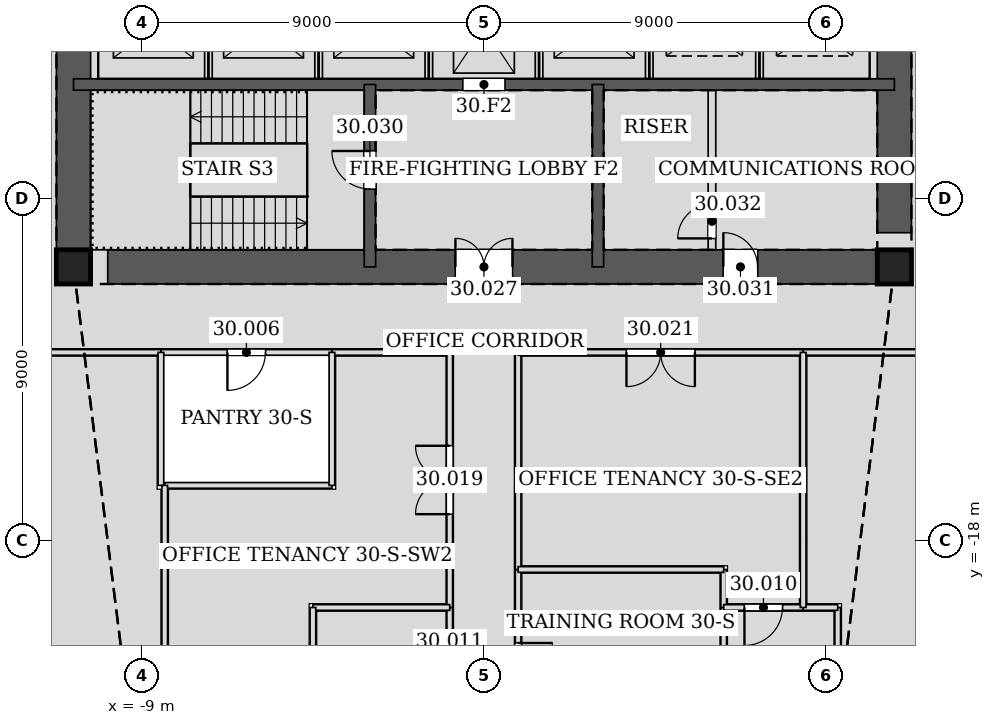
"""IFC4 building model, lengths in metres.
Left out: names, types, materials, properties, quantities, classifications, styles, units other than length and angle.
Written with IfcOpenShell. Run it as: python <this file> out.ifc"""

import sys

from ifc_helpers import new_model, si_unit, direction, frame, frame_2d, origin, origin_2d, place, context, subcontext, project, spatial, rectangle, hollow_rectangle, extrude, element, fill, save


model = new_model("IFC4")
c1 = context("Model", 3, precision=1e-05, world=origin(), true_north=direction((0.0, 1.0)))
c2 = subcontext(c1, "Body", "Model", "MODEL_VIEW")
j1 = project(units=[si_unit("LENGTHUNIT", "METRE"), si_unit("PLANEANGLEUNIT", "RADIAN")], contexts=[c1])
p1 = place(None, origin())
s1 = spatial("IfcSite", under=j1, at=p1, CompositionType="ELEMENT")
p2 = place(p1, origin())
s2 = spatial("IfcBuilding", under=s1, at=p2, CompositionType="ELEMENT")
p3 = place(p2, frame((0.0, 0.0, 134.4)))
s3 = spatial("IfcBuildingStorey", under=s2, at=p3, CompositionType="ELEMENT", Elevation=134.4)
for number, where, z_axis, x_axis in (
    (1, (-10.8, -10.8, 0.0), (0.0, 0.0, 1.0), (1.0, 0.0, 0.0)),
    (2, (10.8, -10.8, 0.0), (0.0, 0.0, 1.0), (1.0, 0.0, 0.0)),
):
    element("IfcColumn", number, at=place(p3, frame(where, z_axis=z_axis, x_axis=x_axis)), inside=s3, PredefinedType="COLUMN", context=c2, shape_type="SweptSolid", body=[
        extrude(hollow_rectangle(XDim=0.9, YDim=0.9, WallThickness=0.06, at=origin_2d()), origin(), (0.0, 0.0, 1.0), 4.2),
    ])
p4 = place(p3, frame((-10.8, -10.8, 0.0), z_axis=(0.0, 0.0, 1.0), x_axis=(1.0, 0.0, 0.0)))
e3 = element("IfcWall", 3, at=p4, inside=s3, PredefinedType="SOLIDWALL", context=c2, shape_type="SweptSolid", body=[
    extrude(rectangle(XDim=21.6, YDim=0.9, at=frame_2d((10.8, 0.0))), origin(), (0.0, 0.0, 1.0), 4.2),
])
p5 = place(p4, frame((10.05, 0.0, 0.0)))
e4 = element("IfcOpeningElement", 4, at=p5, cuts=e3, PredefinedType="OPENING", context=c2, shape_type="SweptSolid", body=[
    extrude(rectangle(XDim=1.5, YDim=2.1, at=frame_2d((0.75, 1.05))), frame((0.0, 0.46, 0.0), z_axis=(0.0, -1.0, 0.0), x_axis=(1.0, 0.0, 0.0)), (0.0, 0.0, 1.0), 0.92),
])
p6 = place(p4, frame((17.1, 0.0, 0.0)))
e5 = element("IfcOpeningElement", 5, at=p6, cuts=e3, PredefinedType="OPENING", context=c2, shape_type="SweptSolid", body=[
    extrude(rectangle(XDim=0.9, YDim=2.1, at=frame_2d((0.45, 1.05))), frame((0.0, 0.46, 0.0), z_axis=(0.0, -1.0, 0.0), x_axis=(1.0, 0.0, 0.0)), (0.0, 0.0, 1.0), 0.92),
])
p7 = place(p3, frame((10.8, -10.8, 0.0), z_axis=(0.0, 0.0, 1.0), x_axis=(0.0, 1.0, 0.0)))
e6 = element("IfcWall", 6, at=p7, inside=s3, PredefinedType="SOLIDWALL", context=c2, shape_type="SweptSolid", body=[
    extrude(rectangle(XDim=21.6, YDim=0.9, at=frame_2d((10.8, 0.0))), origin(), (0.0, 0.0, 1.0), 4.2),
])
p8 = place(p7, frame((11.7, 0.0, 0.0)))
e7 = element("IfcOpeningElement", 7, at=p8, cuts=e6, PredefinedType="OPENING", context=c2, shape_type="SweptSolid", body=[
    extrude(rectangle(XDim=1.2, YDim=2.1, at=frame_2d((0.6, 1.05))), frame((0.0, 0.46, 0.0), z_axis=(0.0, -1.0, 0.0), x_axis=(1.0, 0.0, 0.0)), (0.0, 0.0, 1.0), 0.92),
])
p9 = place(p7, frame((8.7, 0.0, 0.0)))
e8 = element("IfcOpeningElement", 8, at=p9, cuts=e6, PredefinedType="OPENING", context=c2, shape_type="SweptSolid", body=[
    extrude(rectangle(XDim=1.2, YDim=2.1, at=frame_2d((0.6, 1.05))), frame((0.0, 0.46, 0.0), z_axis=(0.0, -1.0, 0.0), x_axis=(1.0, 0.0, 0.0)), (0.0, 0.0, 1.0), 0.92),
])
p10 = place(p3, frame((-10.8, 10.8, 0.0), z_axis=(0.0, 0.0, 1.0), x_axis=(0.0, -1.0, 0.0)))
e9 = element("IfcWall", 9, at=p10, inside=s3, PredefinedType="SOLIDWALL", context=c2, shape_type="SweptSolid", body=[
    extrude(rectangle(XDim=21.6, YDim=0.9, at=frame_2d((10.8, 0.0))), origin(), (0.0, 0.0, 1.0), 4.2),
])
p11 = place(p10, frame((8.7, 0.0, 0.0)))
e10 = element("IfcOpeningElement", 10, at=p11, cuts=e9, PredefinedType="OPENING", context=c2, shape_type="SweptSolid", body=[
    extrude(rectangle(XDim=1.2, YDim=2.1, at=frame_2d((0.6, 1.05))), frame((0.0, 0.46, 0.0), z_axis=(0.0, -1.0, 0.0), x_axis=(1.0, 0.0, 0.0)), (0.0, 0.0, 1.0), 0.92),
])
p12 = place(p10, frame((11.7, 0.0, 0.0)))
e11 = element("IfcOpeningElement", 11, at=p12, cuts=e9, PredefinedType="OPENING", context=c2, shape_type="SweptSolid", body=[
    extrude(rectangle(XDim=1.2, YDim=2.1, at=frame_2d((0.6, 1.05))), frame((0.0, 0.46, 0.0), z_axis=(0.0, -1.0, 0.0), x_axis=(1.0, 0.0, 0.0)), (0.0, 0.0, 1.0), 0.92),
])
p13 = place(p3, frame((-10.8, -6.0, 0.0), z_axis=(0.0, 0.0, 1.0), x_axis=(1.0, 0.0, 0.0)))
e12 = element("IfcWall", 12, at=p13, inside=s3, PredefinedType="SOLIDWALL", context=c2, shape_type="SweptSolid", body=[
    extrude(rectangle(XDim=21.6, YDim=0.3, at=frame_2d((10.8, 0.0))), origin(), (0.0, 0.0, 1.0), 4.2),
])
p14 = place(p13, frame((10.25, 0.0, 0.0)))
e13 = element("IfcOpeningElement", 13, at=p14, cuts=e12, PredefinedType="OPENING", context=c2, shape_type="SweptSolid", body=[
    extrude(rectangle(XDim=1.1, YDim=2.1, at=frame_2d((0.55, 1.05))), frame((0.0, 0.16, 0.0), z_axis=(0.0, -1.0, 0.0), x_axis=(1.0, 0.0, 0.0)), (0.0, 0.0, 1.0), 0.32),
])
p15 = place(p3, frame((-3.0, -6.0, 0.0), z_axis=(0.0, 0.0, 1.0), x_axis=(0.0, -1.0, 0.0)))
e14 = element("IfcWall", 14, at=p15, inside=s3, PredefinedType="SOLIDWALL", context=c2, shape_type="SweptSolid", body=[
    extrude(rectangle(XDim=4.8, YDim=0.3, at=frame_2d((2.4, 0.0))), origin(), (0.0, 0.0, 1.0), 4.2),
])
p16 = place(p15, frame((1.75, 0.0, 0.0)))
e15 = element("IfcOpeningElement", 15, at=p16, cuts=e14, PredefinedType="OPENING", context=c2, shape_type="SweptSolid", body=[
    extrude(rectangle(XDim=1.0, YDim=2.1, at=frame_2d((0.5, 1.05))), frame((0.0, 0.16, 0.0), z_axis=(0.0, -1.0, 0.0), x_axis=(1.0, 0.0, 0.0)), (0.0, 0.0, 1.0), 0.32),
])
p17 = place(p3, frame((3.0, -6.0, 0.0), z_axis=(0.0, 0.0, 1.0), x_axis=(0.0, -1.0, 0.0)))
e16 = element("IfcWall", 16, at=p17, inside=s3, PredefinedType="SOLIDWALL", context=c2, shape_type="SweptSolid", body=[
    extrude(rectangle(XDim=4.8, YDim=0.3, at=frame_2d((2.4, 0.0))), origin(), (0.0, 0.0, 1.0), 4.2),
])
p18 = place(p3, frame((-8.501, -13.05, 0.0), z_axis=(0.0, 0.0, 1.0), x_axis=(1.0, 0.0, 0.0)))
e17 = element("IfcWall", 17, at=p18, inside=s3, PredefinedType="PARTITIONING", context=c2, shape_type="SweptSolid", body=[
    extrude(rectangle(XDim=4.502, YDim=0.15, at=frame_2d((2.251, 0.0))), origin(), (0.0, 0.0, 1.0), 4.035),
])
p19 = place(p18, frame((1.751, 0.0, 0.0)))
e18 = element("IfcOpeningElement", 18, at=p19, cuts=e17, PredefinedType="OPENING", context=c2, shape_type="SweptSolid", body=[
    extrude(rectangle(XDim=1.0, YDim=2.1, at=frame_2d((0.5, 1.05))), frame((0.0, 0.085, 0.0), z_axis=(0.0, -1.0, 0.0), x_axis=(1.0, 0.0, 0.0)), (0.0, 0.0, 1.0), 0.17),
])
p20 = place(p3, frame((0.9, -24.197, 0.0), z_axis=(0.0, 0.0, 1.0), x_axis=(0.0, 1.0, 0.0)))
e19 = element("IfcWall", 19, at=p20, inside=s3, PredefinedType="PARTITIONING", context=c2, shape_type="SweptSolid", body=[
    extrude(rectangle(XDim=5.435, YDim=0.15, at=frame_2d((2.718, 0.0))), origin(), (0.0, 0.0, 1.0), 3.426),
])
p21 = place(p20, frame((1.699, 0.0, 0.0)))
e20 = element("IfcOpeningElement", 20, at=p21, cuts=e19, PredefinedType="OPENING", context=c2, shape_type="SweptSolid", body=[
    extrude(rectangle(XDim=1.8, YDim=2.4, at=frame_2d((0.9, 1.2))), frame((0.0, 0.085, 0.0), z_axis=(0.0, -1.0, 0.0), x_axis=(1.0, 0.0, 0.0)), (0.0, 0.0, 1.0), 0.17),
])
p22 = place(p3, frame((-0.9, -19.762, 0.0), z_axis=(0.0, 0.0, 1.0), x_axis=(0.0, -1.0, 0.0)))
e21 = element("IfcWall", 21, at=p22, inside=s3, PredefinedType="PARTITIONING", context=c2, shape_type="SweptSolid", body=[
    extrude(rectangle(XDim=4.435, YDim=0.15, at=frame_2d((2.218, 0.0))), origin(), (0.0, 0.0, 1.0), 3.426),
])
p23 = place(p22, frame((1.5, 0.0, 0.0)))
e22 = element("IfcOpeningElement", 22, at=p23, cuts=e21, PredefinedType="OPENING", context=c2, shape_type="SweptSolid", body=[
    extrude(rectangle(XDim=1.0, YDim=2.1, at=frame_2d((0.5, 1.05))), frame((0.0, 0.085, 0.0), z_axis=(0.0, -1.0, 0.0), x_axis=(1.0, 0.0, 0.0)), (0.0, 0.0, 1.0), 0.17),
])
p24 = place(p3, frame((-13.05, -13.05, 0.0), z_axis=(0.0, 0.0, 1.0), x_axis=(1.0, 0.0, 0.0)))
e23 = element("IfcWall", 23, at=p24, inside=s3, PredefinedType="PARTITIONING", context=c2, shape_type="SweptSolid", body=[
    extrude(rectangle(XDim=4.551, YDim=0.15, at=frame_2d((2.275, 0.0))), origin(), (0.0, 0.0, 1.0), 3.042),
])
p25 = place(p3, frame((-4.001, -13.05, 0.0), z_axis=(0.0, 0.0, 1.0), x_axis=(1.0, 0.0, 0.0)))
e24 = element("IfcWall", 24, at=p25, inside=s3, PredefinedType="PARTITIONING", context=c2, shape_type="SweptSolid", body=[
    extrude(rectangle(XDim=3.101, YDim=0.15, at=frame_2d((1.551, 0.0))), origin(), (0.0, 0.0, 1.0), 4.035),
])
p26 = place(p3, frame((-0.9, -13.05, 0.0), z_axis=(0.0, 0.0, 1.0), x_axis=(0.0, -1.0, 0.0)))
e25 = element("IfcWall", 25, at=p26, inside=s3, PredefinedType="PARTITIONING", context=c2, shape_type="SweptSolid", body=[
    extrude(rectangle(XDim=6.714, YDim=0.15, at=frame_2d((3.357, 0.0))), origin(), (0.0, 0.0, 1.0), 3.426),
])
p27 = place(p26, frame((2.457, 0.0, 0.0)))
e26 = element("IfcOpeningElement", 26, at=p27, cuts=e25, PredefinedType="OPENING", context=c2, shape_type="SweptSolid", body=[
    extrude(rectangle(XDim=1.8, YDim=2.4, at=frame_2d((0.9, 1.2))), frame((0.0, 0.085, 0.0), z_axis=(0.0, -1.0, 0.0), x_axis=(1.0, 0.0, 0.0)), (0.0, 0.0, 1.0), 0.17),
])
p28 = place(p3, frame((8.399, -13.05, 0.0), z_axis=(0.0, 0.0, 1.0), x_axis=(1.0, 0.0, 0.0)))
e27 = element("IfcWall", 27, at=p28, inside=s3, PredefinedType="PARTITIONING", context=c2, shape_type="SweptSolid", body=[
    extrude(rectangle(XDim=4.651, YDim=0.15, at=frame_2d((2.326, 0.0))), origin(), (0.0, 0.0, 1.0), 3.042),
])
p29 = place(p3, frame((0.9, -18.764, 0.0), z_axis=(0.0, 0.0, 1.0), x_axis=(0.0, 1.0, 0.0)))
e28 = element("IfcWall", 28, at=p29, inside=s3, PredefinedType="PARTITIONING", context=c2, shape_type="SweptSolid", body=[
    extrude(rectangle(XDim=5.714, YDim=0.15, at=frame_2d((2.857, 0.0))), origin(), (0.0, 0.0, 1.0), 3.426),
])
p30 = place(p3, frame((0.9, -13.05, 0.0), z_axis=(0.0, 0.0, 1.0), x_axis=(1.0, 0.0, 0.0)))
e29 = element("IfcWall", 29, at=p30, inside=s3, PredefinedType="PARTITIONING", context=c2, shape_type="SweptSolid", body=[
    extrude(rectangle(XDim=7.501, YDim=0.15, at=frame_2d((3.75, 0.0))), origin(), (0.0, 0.0, 1.0), 4.035),
])
p31 = place(p30, frame((2.851, 0.0, 0.0)))
e30 = element("IfcOpeningElement", 30, at=p31, cuts=e29, PredefinedType="OPENING", context=c2, shape_type="SweptSolid", body=[
    extrude(rectangle(XDim=1.8, YDim=2.4, at=frame_2d((0.9, 1.2))), frame((0.0, 0.085, 0.0), z_axis=(0.0, -1.0, 0.0), x_axis=(1.0, 0.0, 0.0)), (0.0, 0.0, 1.0), 0.17),
])
p32 = place(p3, frame((-8.5, -13.05, 0.0), z_axis=(0.0, 0.0, 1.0), x_axis=(0.0, -1.0, 0.0)))
e31 = element("IfcWall", 31, at=p32, inside=s3, PredefinedType="PARTITIONING", context=c2, shape_type="SweptSolid", body=[
    extrude(rectangle(XDim=3.5, YDim=0.15, at=frame_2d((1.75, 0.0))), origin(), (0.0, 0.0, 1.0), 3.426),
])
p33 = place(p3, frame((-8.401, -16.55, 0.0), z_axis=(0.0, 0.0, 1.0), x_axis=(1.0, 0.0, 0.0)))
e32 = element("IfcWall", 32, at=p33, inside=s3, PredefinedType="PARTITIONING", context=c2, shape_type="SweptSolid", body=[
    extrude(rectangle(XDim=4.401, YDim=0.15, at=frame_2d((2.2, 0.0))), origin(), (0.0, 0.0, 1.0), 4.035),
])
p34 = place(p3, frame((-4.0, -16.55, 0.0), z_axis=(0.0, 0.0, 1.0), x_axis=(0.0, 1.0, 0.0)))
e33 = element("IfcWall", 33, at=p34, inside=s3, PredefinedType="PARTITIONING", context=c2, shape_type="SweptSolid", body=[
    extrude(rectangle(XDim=3.5, YDim=0.15, at=frame_2d((1.75, 0.0))), origin(), (0.0, 0.0, 1.0), 3.426),
])
p35 = place(p3, frame((6.309, -24.195, 0.0), z_axis=(0.0, 0.0, 1.0), x_axis=(0.0, 1.0, 0.0)))
e34 = element("IfcWall", 34, at=p35, inside=s3, PredefinedType="PARTITIONING", context=c2, shape_type="SweptSolid", body=[
    extrude(rectangle(XDim=4.433, YDim=0.15, at=frame_2d((2.216, 0.0))), origin(), (0.0, 0.0, 1.0), 3.426),
])
p36 = place(p3, frame((6.309, -19.764, 0.0), z_axis=(0.0, 0.0, 1.0), x_axis=(0.0, 1.0, 0.0)))
e35 = element("IfcWall", 35, at=p36, inside=s3, PredefinedType="PARTITIONING", context=c2, shape_type="SweptSolid", body=[
    extrude(rectangle(XDim=1.001, YDim=0.15, at=frame_2d((0.5, 0.0))), origin(), (0.0, 0.0, 1.0), 4.035),
])
p37 = place(p3, frame((6.309, -18.763, 0.0), z_axis=(0.0, 0.0, 1.0), x_axis=(-1.0, 0.0, 0.0)))
e36 = element("IfcWall", 36, at=p37, inside=s3, PredefinedType="PARTITIONING", context=c2, shape_type="SweptSolid", body=[
    extrude(rectangle(XDim=5.409, YDim=0.15, at=frame_2d((2.705, 0.0))), origin(), (0.0, 0.0, 1.0), 4.035),
])
p38 = place(p3, frame((9.309, -21.573, 0.0), z_axis=(0.0, 0.0, 1.0), x_axis=(0.0, 1.0, 0.0)))
e37 = element("IfcWall", 37, at=p38, inside=s3, PredefinedType="PARTITIONING", context=c2, shape_type="SweptSolid", body=[
    extrude(rectangle(XDim=1.81, YDim=0.15, at=frame_2d((0.905, 0.0))), origin(), (0.0, 0.0, 1.0), 3.042),
])
p39 = place(p3, frame((9.309, -19.763, 0.0), z_axis=(0.0, 0.0, 1.0), x_axis=(-1.0, 0.0, 0.0)))
e38 = element("IfcWall", 38, at=p39, inside=s3, PredefinedType="PARTITIONING", context=c2, shape_type="SweptSolid", body=[
    extrude(rectangle(XDim=0.91, YDim=0.15, at=frame_2d((0.455, 0.0))), origin(), (0.0, 0.0, 1.0), 4.035),
])
p40 = place(p3, frame((8.401, -19.763, 0.0), z_axis=(0.0, 0.0, 1.0), x_axis=(-1.0, 0.0, 0.0)))
e39 = element("IfcWall", 39, at=p40, inside=s3, PredefinedType="PARTITIONING", context=c2, shape_type="SweptSolid", body=[
    extrude(rectangle(XDim=2.092, YDim=0.15, at=frame_2d((1.046, 0.0))), origin(), (0.0, 0.0, 1.0), 4.035),
])
p41 = place(p40, frame((0.546, 0.0, 0.0)))
e40 = element("IfcOpeningElement", 40, at=p41, cuts=e39, PredefinedType="OPENING", context=c2, shape_type="SweptSolid", body=[
    extrude(rectangle(XDim=1.0, YDim=2.1, at=frame_2d((0.5, 1.05))), frame((0.0, 0.085, 0.0), z_axis=(0.0, -1.0, 0.0), x_axis=(1.0, 0.0, 0.0)), (0.0, 0.0, 1.0), 0.17),
])
p42 = place(p3, frame((-0.9, -19.763, 0.0), z_axis=(0.0, 0.0, 1.0), x_axis=(-1.0, 0.0, 0.0)))
e41 = element("IfcWall", 41, at=p42, inside=s3, PredefinedType="PARTITIONING", context=c2, shape_type="SweptSolid", body=[
    extrude(rectangle(XDim=3.6, YDim=0.15, at=frame_2d((1.8, 0.0))), origin(), (0.0, 0.0, 1.0), 4.035),
])
p43 = place(p3, frame((-4.5, -19.763, 0.0), z_axis=(0.0, 0.0, 1.0), x_axis=(0.0, -1.0, 0.0)))
e42 = element("IfcWall", 42, at=p43, inside=s3, PredefinedType="PARTITIONING", context=c2, shape_type="SweptSolid", body=[
    extrude(rectangle(XDim=4.432, YDim=0.15, at=frame_2d((2.216, 0.0))), origin(), (0.0, 0.0, 1.0), 3.426),
])
p44 = place(p3, frame((-8.4, -21.949, 0.0), z_axis=(0.0, 0.0, 1.0), x_axis=(0.0, 1.0, 0.0)))
e43 = element("IfcWall", 43, at=p44, inside=s3, PredefinedType="PARTITIONING", context=c2, shape_type="SweptSolid", body=[
    extrude(rectangle(XDim=5.399, YDim=0.15, at=frame_2d((2.7, 0.0))), origin(), (0.0, 0.0, 1.0), 3.426),
])
p45 = place(p3, frame((8.4, -13.05, 0.0), z_axis=(0.0, 0.0, 1.0), x_axis=(0.0, -1.0, 0.0)))
e44 = element("IfcWall", 44, at=p45, inside=s3, PredefinedType="PARTITIONING", context=c2, shape_type="SweptSolid", body=[
    extrude(rectangle(XDim=6.713, YDim=0.15, at=frame_2d((3.356, 0.0))), origin(), (0.0, 0.0, 1.0), 3.426),
])
for number, where, z_axis, x_axis in (
    (45, (-7.25, -5.85, 0.0), (0.0, 0.0, 1.0), (0.0, 1.0, 0.0)),
    (46, (-4.35, -5.85, 0.0), (0.0, 0.0, 1.0), (0.0, 1.0, 0.0)),
    (47, (-1.45, -5.85, 0.0), (0.0, 0.0, 1.0), (0.0, 1.0, 0.0)),
    (48, (1.45, -5.85, 0.0), (0.0, 0.0, 1.0), (0.0, 1.0, 0.0)),
    (49, (4.35, -5.85, 0.0), (0.0, 0.0, 1.0), (0.0, 1.0, 0.0)),
    (50, (7.25, -5.85, 0.0), (0.0, 0.0, 1.0), (0.0, 1.0, 0.0)),
):
    element("IfcWall", number, at=place(p3, frame(where, z_axis=z_axis, x_axis=x_axis)), inside=s3, PredefinedType="PARTITIONING", context=c2, shape_type="SweptSolid", body=[
        extrude(rectangle(XDim=2.7, YDim=0.2, at=frame_2d((1.35, 0.0))), origin(), (0.0, 0.0, 1.0), 4.2),
    ])
p46 = place(p3, frame((6.0, -10.35, 0.0), z_axis=(0.0, 0.0, 1.0), x_axis=(0.0, 1.0, 0.0)))
e51 = element("IfcWall", 51, at=p46, inside=s3, PredefinedType="PARTITIONING", context=c2, shape_type="SweptSolid", body=[
    extrude(rectangle(XDim=4.2, YDim=0.2, at=frame_2d((2.1, 0.0))), origin(), (0.0, 0.0, 1.0), 4.035),
])
p47 = place(p46, frame((0.3, 0.0, 0.0)))
e52 = element("IfcOpeningElement", 52, at=p47, cuts=e51, PredefinedType="OPENING", context=c2, shape_type="SweptSolid", body=[
    extrude(rectangle(XDim=0.9, YDim=2.1, at=frame_2d((0.45, 1.05))), frame((0.0, 0.11, 0.0), z_axis=(0.0, -1.0, 0.0), x_axis=(1.0, 0.0, 0.0)), (0.0, 0.0, 1.0), 0.22),
])
p48 = place(p19, frame((1.0, 0.0, 0.0), z_axis=(0.0, 0.0, 1.0), x_axis=(-1.0, 0.0, 0.0)))
e53 = element("IfcDoor", 53, at=p48, inside=s3, OperationType="SINGLE_SWING_RIGHT", PredefinedType="DOOR", context=c2, shape_type="SweptSolid", body=[
    extrude(rectangle(XDim=1.0, YDim=2.1, at=frame_2d((0.5, 1.05))), frame((0.0, 0.025, 0.0), z_axis=(0.0, -1.0, 0.0), x_axis=(1.0, 0.0, 0.0)), (0.0, 0.0, 1.0), 0.05),
])
fill(e18, e53)
p49 = place(p21, frame((1.8, 0.0, 0.0), z_axis=(0.0, 0.0, 1.0), x_axis=(-1.0, 0.0, 0.0)))
e54 = element("IfcDoor", 54, at=p49, inside=s3, OperationType="DOUBLE_DOOR_SINGLE_SWING", PredefinedType="DOOR", context=c2, shape_type="SweptSolid", body=[
    extrude(rectangle(XDim=1.8, YDim=2.4, at=frame_2d((0.9, 1.2))), frame((0.0, 0.025, 0.0), z_axis=(0.0, -1.0, 0.0), x_axis=(1.0, 0.0, 0.0)), (0.0, 0.0, 1.0), 0.05),
])
fill(e20, e54)
p50 = place(p41, origin())
e55 = element("IfcDoor", 55, at=p50, inside=s3, OperationType="SINGLE_SWING_RIGHT", PredefinedType="DOOR", context=c2, shape_type="SweptSolid", body=[
    extrude(rectangle(XDim=1.0, YDim=2.1, at=frame_2d((0.5, 1.05))), frame((0.0, 0.025, 0.0), z_axis=(0.0, -1.0, 0.0), x_axis=(1.0, 0.0, 0.0)), (0.0, 0.0, 1.0), 0.05),
])
fill(e40, e55)
p51 = place(p27, frame((1.8, 0.0, 0.0), z_axis=(0.0, 0.0, 1.0), x_axis=(-1.0, 0.0, 0.0)))
e56 = element("IfcDoor", 56, at=p51, inside=s3, OperationType="DOUBLE_DOOR_SINGLE_SWING", PredefinedType="DOOR", context=c2, shape_type="SweptSolid", body=[
    extrude(rectangle(XDim=1.8, YDim=2.4, at=frame_2d((0.9, 1.2))), frame((0.0, 0.025, 0.0), z_axis=(0.0, -1.0, 0.0), x_axis=(1.0, 0.0, 0.0)), (0.0, 0.0, 1.0), 0.05),
])
fill(e26, e56)
p52 = place(p31, frame((1.8, 0.0, 0.0), z_axis=(0.0, 0.0, 1.0), x_axis=(-1.0, 0.0, 0.0)))
e57 = element("IfcDoor", 57, at=p52, inside=s3, OperationType="DOUBLE_DOOR_SINGLE_SWING", PredefinedType="DOOR", context=c2, shape_type="SweptSolid", body=[
    extrude(rectangle(XDim=1.8, YDim=2.4, at=frame_2d((0.9, 1.2))), frame((0.0, 0.025, 0.0), z_axis=(0.0, -1.0, 0.0), x_axis=(1.0, 0.0, 0.0)), (0.0, 0.0, 1.0), 0.05),
])
fill(e30, e57)
p53 = place(p5, origin())
e58 = element("IfcDoor", 58, at=p53, inside=s3, OperationType="DOUBLE_DOOR_SINGLE_SWING", PredefinedType="DOOR", context=c2, shape_type="SweptSolid", body=[
    extrude(rectangle(XDim=1.5, YDim=2.1, at=frame_2d((0.75, 1.05))), frame((0.0, 0.025, 0.0), z_axis=(0.0, -1.0, 0.0), x_axis=(1.0, 0.0, 0.0)), (0.0, 0.0, 1.0), 0.05),
])
fill(e4, e58)
p54 = place(p16, frame((1.0, 0.0, 0.0), z_axis=(0.0, 0.0, 1.0), x_axis=(-1.0, 0.0, 0.0)))
e59 = element("IfcDoor", 59, at=p54, inside=s3, OperationType="SINGLE_SWING_RIGHT", PredefinedType="DOOR", context=c2, shape_type="SweptSolid", body=[
    extrude(rectangle(XDim=1.0, YDim=2.1, at=frame_2d((0.5, 1.05))), frame((0.0, 0.025, 0.0), z_axis=(0.0, -1.0, 0.0), x_axis=(1.0, 0.0, 0.0)), (0.0, 0.0, 1.0), 0.05),
])
fill(e15, e59)
p55 = place(p6, origin())
e60 = element("IfcDoor", 60, at=p55, inside=s3, OperationType="SINGLE_SWING_LEFT", PredefinedType="DOOR", context=c2, shape_type="SweptSolid", body=[
    extrude(rectangle(XDim=0.9, YDim=2.1, at=frame_2d((0.45, 1.05))), frame((0.0, 0.025, 0.0), z_axis=(0.0, -1.0, 0.0), x_axis=(1.0, 0.0, 0.0)), (0.0, 0.0, 1.0), 0.05),
])
fill(e5, e60)
p56 = place(p47, origin())
e61 = element("IfcDoor", 61, at=p56, inside=s3, OperationType="SINGLE_SWING_LEFT", PredefinedType="DOOR", context=c2, shape_type="SweptSolid", body=[
    extrude(rectangle(XDim=0.9, YDim=2.1, at=frame_2d((0.45, 1.05))), frame((0.0, 0.025, 0.0), z_axis=(0.0, -1.0, 0.0), x_axis=(1.0, 0.0, 0.0)), (0.0, 0.0, 1.0), 0.05),
])
fill(e52, e61)
p57 = place(p14, origin())
e62 = element("IfcDoor", 62, at=p57, inside=s3, OperationType="DOUBLE_DOOR_SLIDING", PredefinedType="DOOR", context=c2, shape_type="SweptSolid", body=[
    extrude(rectangle(XDim=1.1, YDim=2.1, at=frame_2d((0.55, 1.05))), frame((0.0, 0.025, 0.0), z_axis=(0.0, -1.0, 0.0), x_axis=(1.0, 0.0, 0.0)), (0.0, 0.0, 1.0), 0.05),
])
fill(e13, e62)
save(model, sys.argv[1])
